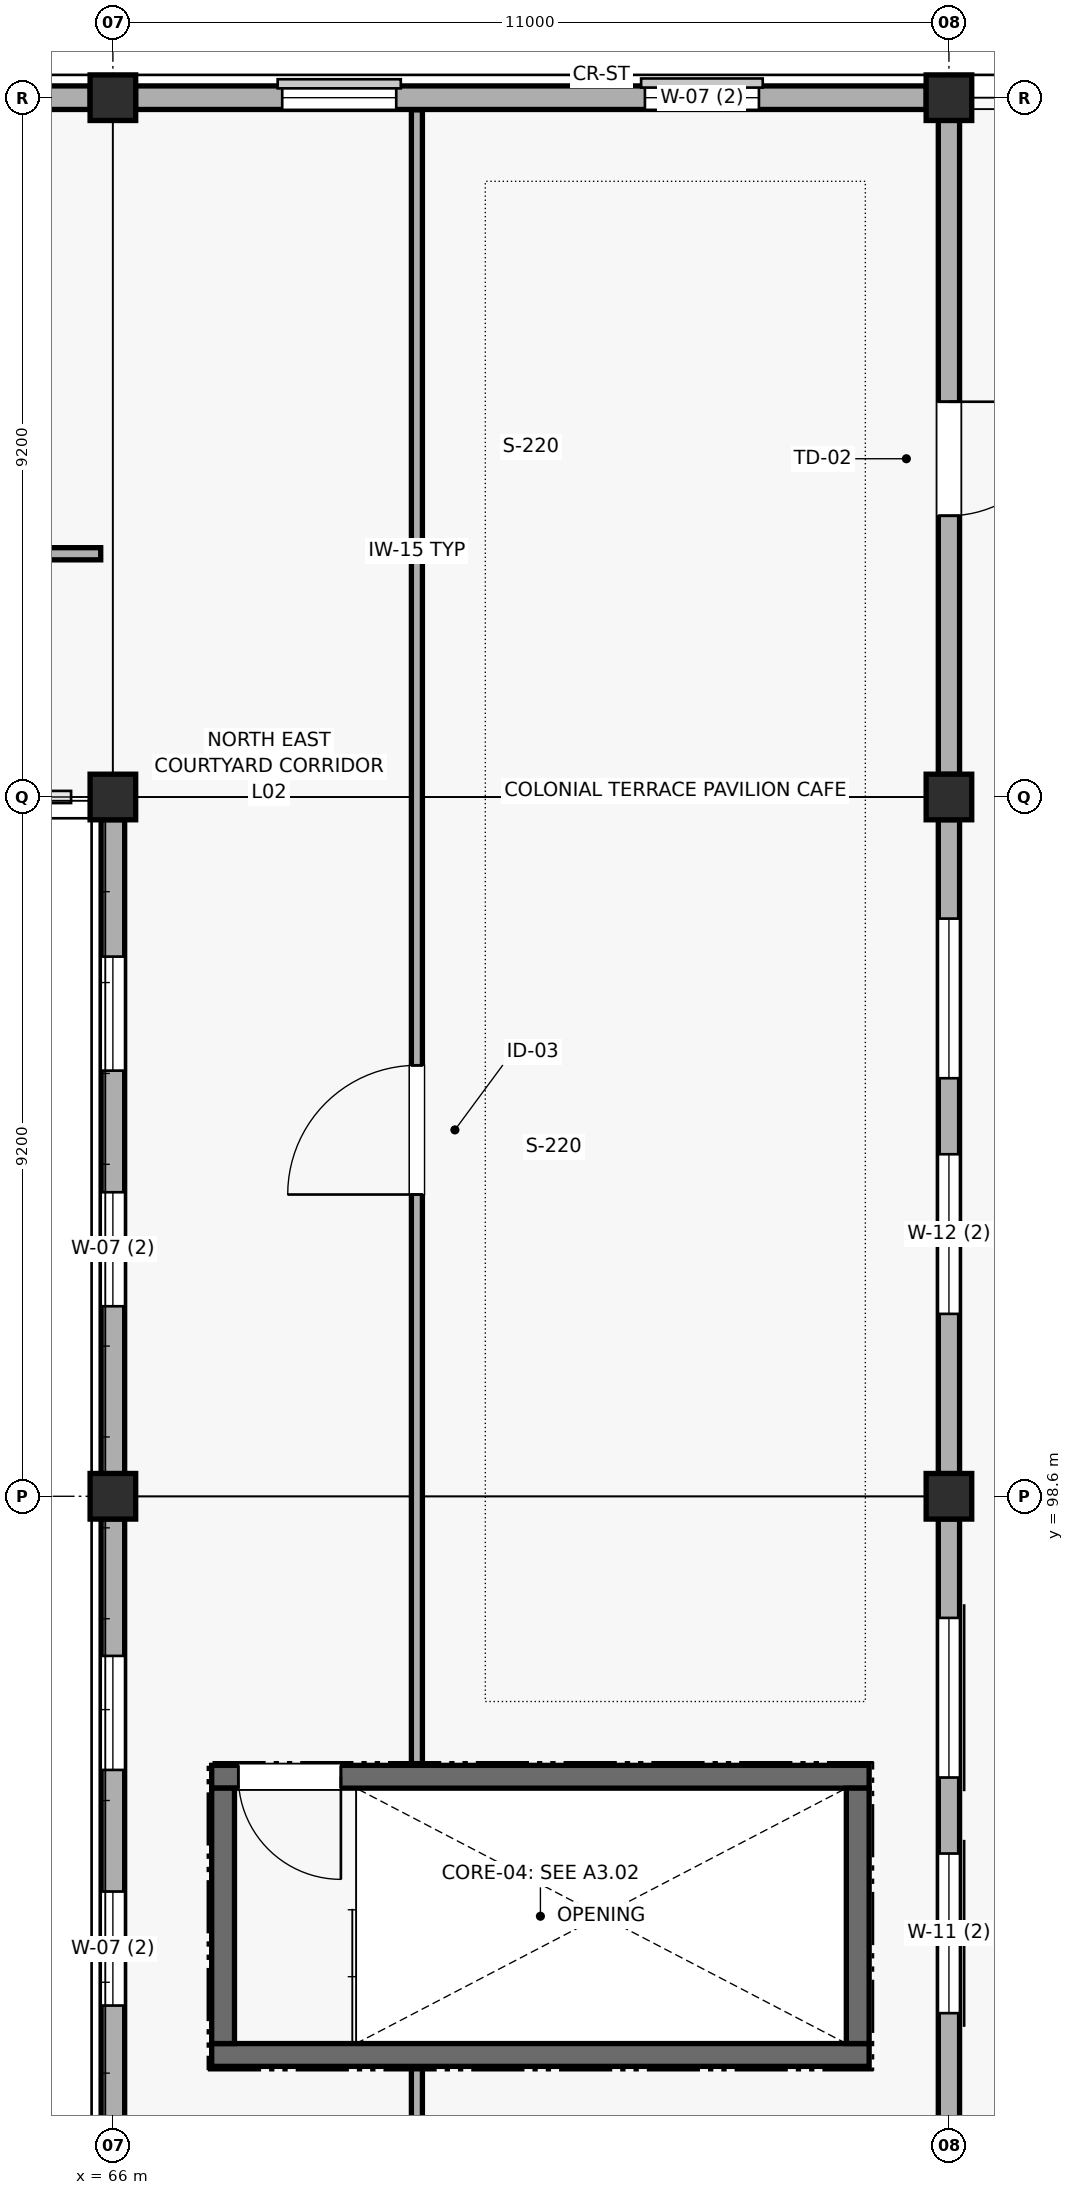
"""IFC4 building model, lengths in metres.
Left out: names, types, materials, properties, quantities, classifications, styles, units other than length and angle.
Written with IfcOpenShell. Run it as: python <this file> out.ifc"""

import sys

from ifc_helpers import new_model, si_unit, direction, frame, frame_2d, origin, origin_2d, place, context, subcontext, project, spatial, rectangle, extrude, element, fill, save


model = new_model("IFC4")
c1 = context("Model", 3, precision=1e-05, world=origin(), true_north=direction((0.0, 1.0)))
c2 = subcontext(c1, "Body", "Model", "MODEL_VIEW")
j1 = project(units=[si_unit("LENGTHUNIT", "METRE"), si_unit("PLANEANGLEUNIT", "RADIAN")], contexts=[c1])
p1 = place(None, origin())
s1 = spatial("IfcSite", under=j1, at=p1, CompositionType="ELEMENT")
p2 = place(p1, origin())
s2 = spatial("IfcBuilding", under=s1, at=p2, CompositionType="ELEMENT")
p3 = place(p2, frame((0.0, 0.0, 9.9)))
s3 = spatial("IfcBuildingStorey", under=s2, at=p3, CompositionType="ELEMENT", Elevation=9.9)
for number, where, z_axis, x_axis in (
    (1, (66.0, 98.6, 0.0), (0.0, 0.0, 1.0), (1.0, 0.0, 0.0)),
    (2, (66.0, 107.8, 0.0), (0.0, 0.0, 1.0), (1.0, 0.0, 0.0)),
    (3, (66.0, 117.0, 0.0), (0.0, 0.0, 1.0), (1.0, 0.0, 0.0)),
    (4, (77.0, 98.6, 0.0), (0.0, 0.0, 1.0), (1.0, 0.0, 0.0)),
    (5, (77.0, 107.8, 0.0), (0.0, 0.0, 1.0), (1.0, 0.0, 0.0)),
    (6, (77.0, 117.0, 0.0), (0.0, 0.0, 1.0), (1.0, 0.0, 0.0)),
):
    element("IfcColumn", number, at=place(p3, frame(where, z_axis=z_axis, x_axis=x_axis)), inside=s3, PredefinedType="COLUMN", context=c2, shape_type="SweptSolid", body=[
        extrude(rectangle(XDim=0.6, YDim=0.6, at=origin_2d()), origin(), (0.0, 0.0, 1.0), 4.2),
    ])
p4 = place(p3, frame((65.702, 117.0, 0.0), z_axis=(0.0, 0.0, 1.0), x_axis=(-1.0, 0.0, 0.0)))
e7 = element("IfcWall", 7, at=p4, inside=s3, PredefinedType="SOLIDWALL", context=c2, shape_type="SweptSolid", body=[
    extrude(rectangle(XDim=10.404, YDim=0.31, at=frame_2d((5.202, 0.0))), origin(), (0.0, 0.0, 1.0), 3.425),
])
p5 = place(p4, frame((2.202, 0.0, 0.95)))
e8 = element("IfcOpeningElement", 8, at=p5, cuts=e7, PredefinedType="OPENING", context=c2, shape_type="SweptSolid", body=[
    extrude(rectangle(XDim=1.5, YDim=2.25, at=frame_2d((0.75, 1.125))), frame((0.0, 0.165, 0.0), z_axis=(0.0, -1.0, 0.0), x_axis=(1.0, 0.0, 0.0)), (0.0, 0.0, 1.0), 0.33),
])
p6 = place(p4, frame((6.002, 0.0, 0.95)))
e9 = element("IfcOpeningElement", 9, at=p6, cuts=e7, PredefinedType="OPENING", context=c2, shape_type="SweptSolid", body=[
    extrude(rectangle(XDim=1.5, YDim=2.25, at=frame_2d((0.75, 1.125))), frame((0.0, 0.165, 0.0), z_axis=(0.0, -1.0, 0.0), x_axis=(1.0, 0.0, 0.0)), (0.0, 0.0, 1.0), 0.33),
])
p7 = place(p3, frame((76.702, 117.0, 0.0), z_axis=(0.0, 0.0, 1.0), x_axis=(-1.0, 0.0, 0.0)))
e10 = element("IfcWall", 10, at=p7, inside=s3, PredefinedType="SOLIDWALL", context=c2, shape_type="SweptSolid", body=[
    extrude(rectangle(XDim=10.404, YDim=0.31, at=frame_2d((5.202, 0.0))), origin(), (0.0, 0.0, 1.0), 3.435),
])
p8 = place(p7, frame((2.202, 0.0, 0.95)))
e11 = element("IfcOpeningElement", 11, at=p8, cuts=e10, PredefinedType="OPENING", context=c2, shape_type="SweptSolid", body=[
    extrude(rectangle(XDim=1.5, YDim=2.25, at=frame_2d((0.75, 1.125))), frame((0.0, 0.165, 0.0), z_axis=(0.0, -1.0, 0.0), x_axis=(1.0, 0.0, 0.0)), (0.0, 0.0, 1.0), 0.33),
])
p9 = place(p7, frame((6.974, 0.0, 0.95)))
e12 = element("IfcOpeningElement", 12, at=p9, cuts=e10, PredefinedType="OPENING", context=c2, shape_type="SweptSolid", body=[
    extrude(rectangle(XDim=1.5, YDim=2.25, at=frame_2d((0.75, 1.125))), frame((0.0, 0.165, 0.0), z_axis=(0.0, -1.0, 0.0), x_axis=(1.0, 0.0, 0.0)), (0.0, 0.0, 1.0), 0.33),
])
p10 = place(p3, frame((77.0, 89.698, 0.0), z_axis=(0.0, 0.0, 1.0), x_axis=(0.0, 1.0, 0.0)))
e13 = element("IfcWall", 13, at=p10, inside=s3, PredefinedType="SOLIDWALL", context=c2, shape_type="SweptSolid", body=[
    extrude(rectangle(XDim=8.604, YDim=0.28, at=frame_2d((4.302, 0.0))), origin(), (0.0, 0.0, 1.0), 3.535),
])
p11 = place(p10, frame((2.102, 0.0, 0.95)))
e14 = element("IfcOpeningElement", 14, at=p11, cuts=e13, PredefinedType="OPENING", context=c2, shape_type="SweptSolid", body=[
    extrude(rectangle(XDim=2.1, YDim=1.8, at=frame_2d((1.05, 0.9))), frame((0.0, 0.15, 0.0), z_axis=(0.0, -1.0, 0.0), x_axis=(1.0, 0.0, 0.0)), (0.0, 0.0, 1.0), 0.3),
])
p12 = place(p10, frame((5.202, 0.0, 0.95)))
e15 = element("IfcOpeningElement", 15, at=p12, cuts=e13, PredefinedType="OPENING", context=c2, shape_type="SweptSolid", body=[
    extrude(rectangle(XDim=2.1, YDim=1.8, at=frame_2d((1.05, 0.9))), frame((0.0, 0.15, 0.0), z_axis=(0.0, -1.0, 0.0), x_axis=(1.0, 0.0, 0.0)), (0.0, 0.0, 1.0), 0.3),
])
p13 = place(p3, frame((77.0, 98.898, 0.0), z_axis=(0.0, 0.0, 1.0), x_axis=(0.0, 1.0, 0.0)))
e16 = element("IfcWall", 16, at=p13, inside=s3, PredefinedType="SOLIDWALL", context=c2, shape_type="SweptSolid", body=[
    extrude(rectangle(XDim=8.604, YDim=0.28, at=frame_2d((4.302, 0.0))), origin(), (0.0, 0.0, 1.0), 3.535),
])
p14 = place(p13, frame((2.102, 0.0, 0.8)))
e17 = element("IfcOpeningElement", 17, at=p14, cuts=e16, PredefinedType="OPENING", context=c2, shape_type="SweptSolid", body=[
    extrude(rectangle(XDim=2.1, YDim=2.4, at=frame_2d((1.05, 1.2))), frame((0.0, 0.15, 0.0), z_axis=(0.0, -1.0, 0.0), x_axis=(1.0, 0.0, 0.0)), (0.0, 0.0, 1.0), 0.3),
])
p15 = place(p13, frame((5.202, 0.0, 0.8)))
e18 = element("IfcOpeningElement", 18, at=p15, cuts=e16, PredefinedType="OPENING", context=c2, shape_type="SweptSolid", body=[
    extrude(rectangle(XDim=2.1, YDim=2.4, at=frame_2d((1.05, 1.2))), frame((0.0, 0.15, 0.0), z_axis=(0.0, -1.0, 0.0), x_axis=(1.0, 0.0, 0.0)), (0.0, 0.0, 1.0), 0.3),
])
p16 = place(p3, frame((77.0, 108.098, 0.0), z_axis=(0.0, 0.0, 1.0), x_axis=(0.0, 1.0, 0.0)))
e19 = element("IfcWall", 19, at=p16, inside=s3, PredefinedType="SOLIDWALL", context=c2, shape_type="SweptSolid", body=[
    extrude(rectangle(XDim=8.604, YDim=0.28, at=frame_2d((4.302, 0.0))), origin(), (0.0, 0.0, 1.0), 3.535),
])
p17 = place(p16, frame((3.402, 0.0, 0.0)))
e20 = element("IfcOpeningElement", 20, at=p17, cuts=e19, PredefinedType="OPENING", context=c2, shape_type="SweptSolid", body=[
    extrude(rectangle(XDim=1.5, YDim=2.25, at=frame_2d((0.75, 1.125))), frame((0.0, 0.15, 0.0), z_axis=(0.0, -1.0, 0.0), x_axis=(1.0, 0.0, 0.0)), (0.0, 0.0, 1.0), 0.3),
])
p18 = place(p3, frame((66.0, 89.698, 0.0), z_axis=(0.0, 0.0, 1.0), x_axis=(0.0, 1.0, 0.0)))
e21 = element("IfcWall", 21, at=p18, inside=s3, PredefinedType="SOLIDWALL", context=c2, shape_type="SweptSolid", body=[
    extrude(rectangle(XDim=8.604, YDim=0.31, at=frame_2d((4.302, 0.0))), origin(), (0.0, 0.0, 1.0), 3.535),
])
p19 = place(p18, frame((2.202, 0.0, 0.95)))
e22 = element("IfcOpeningElement", 22, at=p19, cuts=e21, PredefinedType="OPENING", context=c2, shape_type="SweptSolid", body=[
    extrude(rectangle(XDim=1.5, YDim=2.25, at=frame_2d((0.75, 1.125))), frame((0.0, 0.165, 0.0), z_axis=(0.0, -1.0, 0.0), x_axis=(1.0, 0.0, 0.0)), (0.0, 0.0, 1.0), 0.33),
])
p20 = place(p18, frame((5.302, 0.0, 0.95)))
e23 = element("IfcOpeningElement", 23, at=p20, cuts=e21, PredefinedType="OPENING", context=c2, shape_type="SweptSolid", body=[
    extrude(rectangle(XDim=1.5, YDim=2.25, at=frame_2d((0.75, 1.125))), frame((0.0, 0.165, 0.0), z_axis=(0.0, -1.0, 0.0), x_axis=(1.0, 0.0, 0.0)), (0.0, 0.0, 1.0), 0.33),
])
p21 = place(p3, frame((66.0, 98.898, 0.0), z_axis=(0.0, 0.0, 1.0), x_axis=(0.0, 1.0, 0.0)))
e24 = element("IfcWall", 24, at=p21, inside=s3, PredefinedType="SOLIDWALL", context=c2, shape_type="SweptSolid", body=[
    extrude(rectangle(XDim=8.604, YDim=0.31, at=frame_2d((4.302, 0.0))), origin(), (0.0, 0.0, 1.0), 3.535),
])
p22 = place(p21, frame((2.202, 0.0, 0.95)))
e25 = element("IfcOpeningElement", 25, at=p22, cuts=e24, PredefinedType="OPENING", context=c2, shape_type="SweptSolid", body=[
    extrude(rectangle(XDim=1.5, YDim=2.25, at=frame_2d((0.75, 1.125))), frame((0.0, 0.165, 0.0), z_axis=(0.0, -1.0, 0.0), x_axis=(1.0, 0.0, 0.0)), (0.0, 0.0, 1.0), 0.33),
])
p23 = place(p21, frame((5.302, 0.0, 0.95)))
e26 = element("IfcOpeningElement", 26, at=p23, cuts=e24, PredefinedType="OPENING", context=c2, shape_type="SweptSolid", body=[
    extrude(rectangle(XDim=1.5, YDim=2.25, at=frame_2d((0.75, 1.125))), frame((0.0, 0.165, 0.0), z_axis=(0.0, -1.0, 0.0), x_axis=(1.0, 0.0, 0.0)), (0.0, 0.0, 1.0), 0.33),
])
p24 = place(p3, frame((67.3, 91.25, 0.0), z_axis=(0.0, 0.0, 1.0), x_axis=(1.0, 0.0, 0.0)))
e27 = element("IfcWall", 27, at=p24, inside=s3, PredefinedType="SHEAR", context=c2, shape_type="SweptSolid", body=[
    extrude(rectangle(XDim=8.65, YDim=0.3, at=frame_2d((4.325, 0.0))), origin(), (0.0, 0.0, 1.0), 3.99),
])
p25 = place(p3, frame((75.95, 94.91, 0.0), z_axis=(0.0, 0.0, 1.0), x_axis=(-1.0, 0.0, 0.0)))
e28 = element("IfcWall", 28, at=p25, inside=s3, PredefinedType="SHEAR", context=c2, shape_type="SweptSolid", body=[
    extrude(rectangle(XDim=8.65, YDim=0.3, at=frame_2d((4.325, 0.0))), origin(), (0.0, 0.0, 1.0), 3.99),
])
p26 = place(p25, frame((6.95, 0.0, 0.0)))
e29 = element("IfcOpeningElement", 29, at=p26, cuts=e28, PredefinedType="OPENING", context=c2, shape_type="SweptSolid", body=[
    extrude(rectangle(XDim=1.35, YDim=2.2, at=frame_2d((0.675, 1.1))), frame((0.0, 0.16, 0.0), z_axis=(0.0, -1.0, 0.0), x_axis=(1.0, 0.0, 0.0)), (0.0, 0.0, 1.0), 0.32),
])
for number, where, z_axis, x_axis in (
    (30, (67.45, 94.76, 0.0), (0.0, 0.0, 1.0), (0.0, -1.0, 0.0)),
    (31, (75.8, 91.4, 0.0), (0.0, 0.0, 1.0), (0.0, 1.0, 0.0)),
):
    element("IfcWall", number, at=place(p3, frame(where, z_axis=z_axis, x_axis=x_axis)), inside=s3, PredefinedType="SHEAR", context=c2, shape_type="SweptSolid", body=[
        extrude(rectangle(XDim=3.36, YDim=0.3, at=frame_2d((1.68, 0.0))), origin(), (0.0, 0.0, 1.0), 3.99),
    ])
p27 = place(p3, frame((22.16, 111.0, 0.0), z_axis=(0.0, 0.0, 1.0), x_axis=(1.0, 0.0, 0.0)))
e32 = element("IfcWall", 32, at=p27, inside=s3, PredefinedType="PARTITIONING", context=c2, shape_type="SweptSolid", body=[
    extrude(rectangle(XDim=43.68, YDim=0.16, at=frame_2d((21.84, 0.0))), origin(), (0.0, 0.0, 1.0), 3.525),
])
p28 = place(p27, frame((11.5, 0.0, 0.0)))
e33 = element("IfcOpeningElement", 33, at=p28, cuts=e32, PredefinedType="OPENING", context=c2, shape_type="SweptSolid", body=[
    extrude(rectangle(XDim=1.05, YDim=2.2, at=frame_2d((0.525, 1.1))), frame((0.0, 0.09, 0.0), z_axis=(0.0, -1.0, 0.0), x_axis=(1.0, 0.0, 0.0)), (0.0, 0.0, 1.0), 0.18),
])
p29 = place(p27, frame((34.5, 0.0, 0.0)))
e34 = element("IfcOpeningElement", 34, at=p29, cuts=e32, PredefinedType="OPENING", context=c2, shape_type="SweptSolid", body=[
    extrude(rectangle(XDim=1.15, YDim=2.2, at=frame_2d((0.575, 1.1))), frame((0.0, 0.09, 0.0), z_axis=(0.0, -1.0, 0.0), x_axis=(1.0, 0.0, 0.0)), (0.0, 0.0, 1.0), 0.18),
])
p30 = place(p3, frame((70.0, 95.065, 0.0), z_axis=(0.0, 0.0, 1.0), x_axis=(0.0, 1.0, 0.0)))
e35 = element("IfcWall", 35, at=p30, inside=s3, PredefinedType="PARTITIONING", context=c2, shape_type="SweptSolid", body=[
    extrude(rectangle(XDim=21.775, YDim=0.145, at=frame_2d((10.888, 0.0))), origin(), (0.0, 0.0, 1.0), 3.435),
])
p31 = place(p30, frame((7.505, 0.0, 0.0)))
e36 = element("IfcOpeningElement", 36, at=p31, cuts=e35, PredefinedType="OPENING", context=c2, shape_type="SweptSolid", body=[
    extrude(rectangle(XDim=1.7, YDim=2.35, at=frame_2d((0.85, 1.175))), frame((0.0, 0.083, 0.0), z_axis=(0.0, -1.0, 0.0), x_axis=(1.0, 0.0, 0.0)), (0.0, 0.0, 1.0), 0.165),
])
p32 = place(p3, frame((70.0, 71.745, 0.0), z_axis=(0.0, 0.0, 1.0), x_axis=(0.0, 1.0, 0.0)))
e37 = element("IfcWall", 37, at=p32, inside=s3, PredefinedType="PARTITIONING", context=c2, shape_type="SweptSolid", body=[
    extrude(rectangle(XDim=19.35, YDim=0.145, at=frame_2d((9.675, 0.0))), origin(), (0.0, 0.0, 1.0), 3.373),
])
p33 = place(p32, frame((7.555, 0.0, 0.0)))
e38 = element("IfcOpeningElement", 38, at=p33, cuts=e37, PredefinedType="OPENING", context=c2, shape_type="SweptSolid", body=[
    extrude(rectangle(XDim=1.0, YDim=2.15, at=frame_2d((0.5, 1.075))), frame((0.0, 0.083, 0.0), z_axis=(0.0, -1.0, 0.0), x_axis=(1.0, 0.0, 0.0)), (0.0, 0.0, 1.0), 0.165),
])
p34 = place(p8, origin())
e39 = element("IfcWindow", 39, at=p34, inside=s3, PartitioningType="SINGLE_PANEL", PredefinedType="WINDOW", context=c2, shape_type="SweptSolid", body=[
    extrude(rectangle(XDim=1.5, YDim=2.25, at=frame_2d((0.75, 1.125))), frame((0.0, 0.03, 0.0), z_axis=(0.0, -1.0, 0.0), x_axis=(1.0, 0.0, 0.0)), (0.0, 0.0, 1.0), 0.06),
])
fill(e11, e39)
p35 = place(p9, origin())
e40 = element("IfcWindow", 40, at=p35, inside=s3, PartitioningType="SINGLE_PANEL", PredefinedType="WINDOW", context=c2, shape_type="SweptSolid", body=[
    extrude(rectangle(XDim=1.5, YDim=2.25, at=frame_2d((0.75, 1.125))), frame((0.0, 0.03, 0.0), z_axis=(0.0, -1.0, 0.0), x_axis=(1.0, 0.0, 0.0)), (0.0, 0.0, 1.0), 0.06),
])
fill(e12, e40)
p36 = place(p11, origin())
e41 = element("IfcWindow", 41, at=p36, inside=s3, PartitioningType="SINGLE_PANEL", PredefinedType="WINDOW", context=c2, shape_type="SweptSolid", body=[
    extrude(rectangle(XDim=2.1, YDim=1.8, at=frame_2d((1.05, 0.9))), frame((0.0, 0.03, 0.0), z_axis=(0.0, -1.0, 0.0), x_axis=(1.0, 0.0, 0.0)), (0.0, 0.0, 1.0), 0.06),
])
fill(e14, e41)
p37 = place(p12, origin())
e42 = element("IfcWindow", 42, at=p37, inside=s3, PartitioningType="SINGLE_PANEL", PredefinedType="WINDOW", context=c2, shape_type="SweptSolid", body=[
    extrude(rectangle(XDim=2.1, YDim=1.8, at=frame_2d((1.05, 0.9))), frame((0.0, 0.03, 0.0), z_axis=(0.0, -1.0, 0.0), x_axis=(1.0, 0.0, 0.0)), (0.0, 0.0, 1.0), 0.06),
])
fill(e15, e42)
p38 = place(p14, origin())
e43 = element("IfcWindow", 43, at=p38, inside=s3, PartitioningType="SINGLE_PANEL", PredefinedType="WINDOW", context=c2, shape_type="SweptSolid", body=[
    extrude(rectangle(XDim=2.1, YDim=2.4, at=frame_2d((1.05, 1.2))), frame((0.0, 0.03, 0.0), z_axis=(0.0, -1.0, 0.0), x_axis=(1.0, 0.0, 0.0)), (0.0, 0.0, 1.0), 0.06),
])
fill(e17, e43)
p39 = place(p15, origin())
e44 = element("IfcWindow", 44, at=p39, inside=s3, PartitioningType="SINGLE_PANEL", PredefinedType="WINDOW", context=c2, shape_type="SweptSolid", body=[
    extrude(rectangle(XDim=2.1, YDim=2.4, at=frame_2d((1.05, 1.2))), frame((0.0, 0.03, 0.0), z_axis=(0.0, -1.0, 0.0), x_axis=(1.0, 0.0, 0.0)), (0.0, 0.0, 1.0), 0.06),
])
fill(e18, e44)
p40 = place(p17, frame((1.5, 0.0, 0.0), z_axis=(0.0, 0.0, 1.0), x_axis=(-1.0, 0.0, 0.0)))
e45 = element("IfcDoor", 45, at=p40, inside=s3, OperationType="SINGLE_SWING_LEFT", PredefinedType="DOOR", context=c2, shape_type="SweptSolid", body=[
    extrude(rectangle(XDim=1.5, YDim=2.25, at=frame_2d((0.75, 1.125))), frame((0.0, 0.025, 0.0), z_axis=(0.0, -1.0, 0.0), x_axis=(1.0, 0.0, 0.0)), (0.0, 0.0, 1.0), 0.05),
])
fill(e20, e45)
p41 = place(p19, origin())
e46 = element("IfcWindow", 46, at=p41, inside=s3, PartitioningType="SINGLE_PANEL", PredefinedType="WINDOW", context=c2, shape_type="SweptSolid", body=[
    extrude(rectangle(XDim=1.5, YDim=2.25, at=frame_2d((0.75, 1.125))), frame((0.0, 0.03, 0.0), z_axis=(0.0, -1.0, 0.0), x_axis=(1.0, 0.0, 0.0)), (0.0, 0.0, 1.0), 0.06),
])
fill(e22, e46)
p42 = place(p20, origin())
e47 = element("IfcWindow", 47, at=p42, inside=s3, PartitioningType="SINGLE_PANEL", PredefinedType="WINDOW", context=c2, shape_type="SweptSolid", body=[
    extrude(rectangle(XDim=1.5, YDim=2.25, at=frame_2d((0.75, 1.125))), frame((0.0, 0.03, 0.0), z_axis=(0.0, -1.0, 0.0), x_axis=(1.0, 0.0, 0.0)), (0.0, 0.0, 1.0), 0.06),
])
fill(e23, e47)
p43 = place(p22, origin())
e48 = element("IfcWindow", 48, at=p43, inside=s3, PartitioningType="SINGLE_PANEL", PredefinedType="WINDOW", context=c2, shape_type="SweptSolid", body=[
    extrude(rectangle(XDim=1.5, YDim=2.25, at=frame_2d((0.75, 1.125))), frame((0.0, 0.03, 0.0), z_axis=(0.0, -1.0, 0.0), x_axis=(1.0, 0.0, 0.0)), (0.0, 0.0, 1.0), 0.06),
])
fill(e25, e48)
p44 = place(p23, origin())
e49 = element("IfcWindow", 49, at=p44, inside=s3, PartitioningType="SINGLE_PANEL", PredefinedType="WINDOW", context=c2, shape_type="SweptSolid", body=[
    extrude(rectangle(XDim=1.5, YDim=2.25, at=frame_2d((0.75, 1.125))), frame((0.0, 0.03, 0.0), z_axis=(0.0, -1.0, 0.0), x_axis=(1.0, 0.0, 0.0)), (0.0, 0.0, 1.0), 0.06),
])
fill(e26, e49)
p45 = place(p26, origin())
e50 = element("IfcDoor", 50, at=p45, inside=s3, OperationType="SINGLE_SWING_LEFT", PredefinedType="DOOR", context=c2, shape_type="SweptSolid", body=[
    extrude(rectangle(XDim=1.35, YDim=2.2, at=frame_2d((0.675, 1.1))), frame((0.0, 0.025, 0.0), z_axis=(0.0, -1.0, 0.0), x_axis=(1.0, 0.0, 0.0)), (0.0, 0.0, 1.0), 0.05),
])
fill(e29, e50)
p46 = place(p31, origin())
e51 = element("IfcDoor", 51, at=p46, inside=s3, OperationType="SINGLE_SWING_LEFT", PredefinedType="DOOR", context=c2, shape_type="SweptSolid", body=[
    extrude(rectangle(XDim=1.7, YDim=2.35, at=frame_2d((0.85, 1.175))), frame((0.0, 0.025, 0.0), z_axis=(0.0, -1.0, 0.0), x_axis=(1.0, 0.0, 0.0)), (0.0, 0.0, 1.0), 0.05),
])
fill(e36, e51)
save(model, sys.argv[1])
